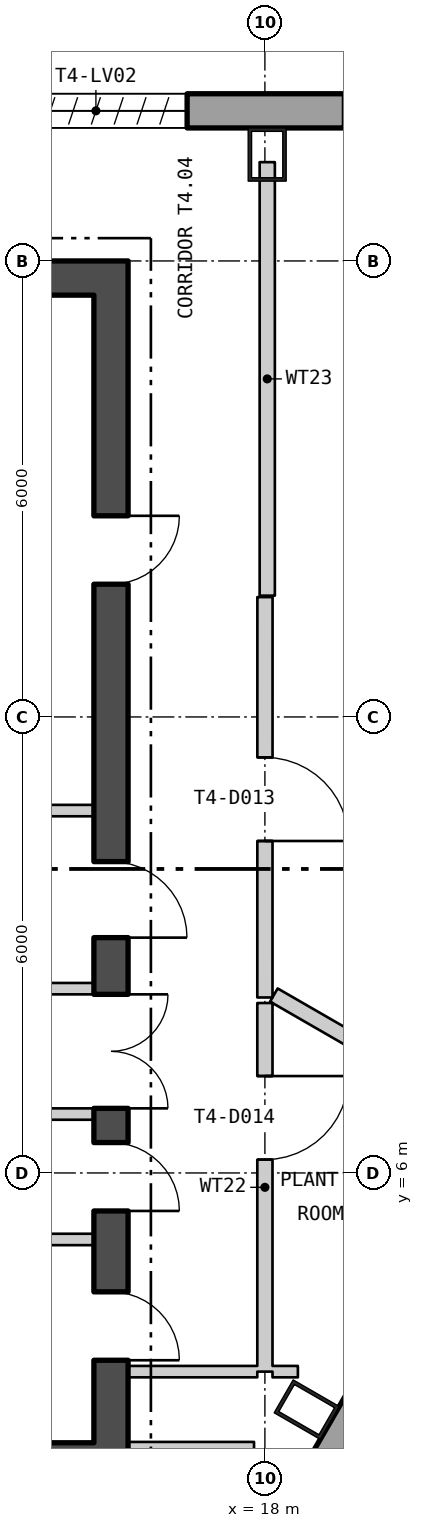
"""IFC4 building model, lengths in metres.
Left out: names, types, materials, properties, quantities, classifications, styles, units other than length and angle.
Written with IfcOpenShell. Run it as: python <this file> out.ifc"""

import sys

from ifc_helpers import new_model, si_unit, direction, frame, frame_2d, origin, origin_2d, place, context, subcontext, project, spatial, polyline, rectangle, hollow_rectangle, outline, extrude, element, fill, save


model = new_model("IFC4")
c1 = context("Model", 3, precision=1e-05, world=origin(), true_north=direction((0.0, 1.0)))
c2 = subcontext(c1, "Body", "Model", "MODEL_VIEW")
j1 = project(units=[si_unit("LENGTHUNIT", "METRE"), si_unit("PLANEANGLEUNIT", "RADIAN")], contexts=[c1])
p1 = place(None, origin())
s1 = spatial("IfcSite", under=j1, at=p1, CompositionType="ELEMENT")
p2 = place(p1, origin())
s2 = spatial("IfcBuilding", under=s1, at=p2, CompositionType="ELEMENT")
p3 = place(p2, frame((0.0, 0.0, 239.4)))
s3 = spatial("IfcBuildingStorey", under=s2, at=p3, CompositionType="ELEMENT", Elevation=239.4)
for number, where, z_axis, x_axis in (
    (1, (18.03, 19.4, 0.0), (0.0, 0.0, 1.0), (-1.0, 0.0, 0.0)),
    (2, (18.55, 2.886, 0.0), (0.0, 0.0, 1.0), (0.5, 0.866, 0.0)),
):
    element("IfcColumn", number, at=place(p3, frame(where, z_axis=z_axis, x_axis=x_axis)), inside=s3, PredefinedType="COLUMN", context=c2, shape_type="SweptSolid", body=[
        extrude(hollow_rectangle(XDim=0.5, YDim=0.7, WallThickness=0.045, at=origin_2d()), origin(), (0.0, 0.0, 1.0), 6.0),
    ])
p4 = place(p3, frame((22.87, 19.975, -0.4), z_axis=(0.0, 0.0, 1.0), x_axis=(-1.0, 0.0, 0.0)))
e3 = element("IfcWall", 3, at=p4, inside=s3, PredefinedType="SOLIDWALL", context=c2, shape_type="SweptSolid", body=[
    extrude(outline(polyline([(-0.13, -0.225), (45.87, -0.225), (45.61, 0.225), (0.13, 0.225), (-0.13, -0.225)])), origin(), (0.0, 0.0, 1.0), 6.0),
])
p5 = place(p4, frame((1.424, 0.0, 1.6)))
e4 = element("IfcOpeningElement", 4, at=p5, cuts=e3, PredefinedType="OPENING", context=c2, shape_type="SweptSolid", body=[
    extrude(rectangle(XDim=2.4, YDim=3.6, at=frame_2d((1.2, 1.8))), frame((0.0, 0.235, 0.0), z_axis=(0.0, -1.0, 0.0), x_axis=(1.0, 0.0, 0.0)), (0.0, 0.0, 1.0), 0.47),
])
p6 = place(p4, frame((5.893, 0.0, 1.6)))
e5 = element("IfcOpeningElement", 5, at=p6, cuts=e3, PredefinedType="OPENING", context=c2, shape_type="SweptSolid", body=[
    extrude(rectangle(XDim=2.4, YDim=3.6, at=frame_2d((1.2, 1.8))), frame((0.0, 0.235, 0.0), z_axis=(0.0, -1.0, 0.0), x_axis=(1.0, 0.0, 0.0)), (0.0, 0.0, 1.0), 0.47),
])
p7 = place(p4, frame((10.401, 0.0, 1.6)))
e6 = element("IfcOpeningElement", 6, at=p7, cuts=e3, PredefinedType="OPENING", context=c2, shape_type="SweptSolid", body=[
    extrude(rectangle(XDim=2.4, YDim=3.6, at=frame_2d((1.2, 1.8))), frame((0.0, 0.235, 0.0), z_axis=(0.0, -1.0, 0.0), x_axis=(1.0, 0.0, 0.0)), (0.0, 0.0, 1.0), 0.47),
])
p8 = place(p4, frame((14.909, 0.0, 1.6)))
e7 = element("IfcOpeningElement", 7, at=p8, cuts=e3, PredefinedType="OPENING", context=c2, shape_type="SweptSolid", body=[
    extrude(rectangle(XDim=2.4, YDim=3.6, at=frame_2d((1.2, 1.8))), frame((0.0, 0.235, 0.0), z_axis=(0.0, -1.0, 0.0), x_axis=(1.0, 0.0, 0.0)), (0.0, 0.0, 1.0), 0.47),
])
p9 = place(p4, frame((19.416, 0.0, 1.6)))
e8 = element("IfcOpeningElement", 8, at=p9, cuts=e3, PredefinedType="OPENING", context=c2, shape_type="SweptSolid", body=[
    extrude(rectangle(XDim=2.4, YDim=3.6, at=frame_2d((1.2, 1.8))), frame((0.0, 0.235, 0.0), z_axis=(0.0, -1.0, 0.0), x_axis=(1.0, 0.0, 0.0)), (0.0, 0.0, 1.0), 0.47),
])
p10 = place(p4, frame((23.924, 0.0, 1.6)))
e9 = element("IfcOpeningElement", 9, at=p10, cuts=e3, PredefinedType="OPENING", context=c2, shape_type="SweptSolid", body=[
    extrude(rectangle(XDim=2.4, YDim=3.6, at=frame_2d((1.2, 1.8))), frame((0.0, 0.235, 0.0), z_axis=(0.0, -1.0, 0.0), x_axis=(1.0, 0.0, 0.0)), (0.0, 0.0, 1.0), 0.47),
])
p11 = place(p4, frame((28.431, 0.0, 1.6)))
e10 = element("IfcOpeningElement", 10, at=p11, cuts=e3, PredefinedType="OPENING", context=c2, shape_type="SweptSolid", body=[
    extrude(rectangle(XDim=2.4, YDim=3.6, at=frame_2d((1.2, 1.8))), frame((0.0, 0.235, 0.0), z_axis=(0.0, -1.0, 0.0), x_axis=(1.0, 0.0, 0.0)), (0.0, 0.0, 1.0), 0.47),
])
p12 = place(p4, frame((32.939, 0.0, 1.6)))
e11 = element("IfcOpeningElement", 11, at=p12, cuts=e3, PredefinedType="OPENING", context=c2, shape_type="SweptSolid", body=[
    extrude(rectangle(XDim=2.4, YDim=3.6, at=frame_2d((1.2, 1.8))), frame((0.0, 0.235, 0.0), z_axis=(0.0, -1.0, 0.0), x_axis=(1.0, 0.0, 0.0)), (0.0, 0.0, 1.0), 0.47),
])
p13 = place(p4, frame((37.447, 0.0, 1.6)))
e12 = element("IfcOpeningElement", 12, at=p13, cuts=e3, PredefinedType="OPENING", context=c2, shape_type="SweptSolid", body=[
    extrude(rectangle(XDim=2.4, YDim=3.6, at=frame_2d((1.2, 1.8))), frame((0.0, 0.235, 0.0), z_axis=(0.0, -1.0, 0.0), x_axis=(1.0, 0.0, 0.0)), (0.0, 0.0, 1.0), 0.47),
])
p14 = place(p4, frame((41.916, 0.0, 1.6)))
e13 = element("IfcOpeningElement", 13, at=p14, cuts=e3, PredefinedType="OPENING", context=c2, shape_type="SweptSolid", body=[
    extrude(rectangle(XDim=2.4, YDim=3.6, at=frame_2d((1.2, 1.8))), frame((0.0, 0.235, 0.0), z_axis=(0.0, -1.0, 0.0), x_axis=(1.0, 0.0, 0.0)), (0.0, 0.0, 1.0), 0.47),
])
p15 = place(p3, frame((3.105, -25.015, -0.18), z_axis=(0.0, 0.0, 1.0), x_axis=(0.499999764979, 0.866025539474, 0.0)))
e14 = element("IfcWall", 14, at=p15, inside=s3, PredefinedType="SOLIDWALL", context=c2, shape_type="SweptSolid", body=[
    extrude(outline(polyline([(-0.13, -0.225), (45.87, -0.225), (45.61, 0.225), (0.13, 0.225), (-0.13, -0.225)])), origin(), (0.0, 0.0, 1.0), 6.0),
])
p16 = place(p15, frame((1.424, 0.0, 1.38)))
e15 = element("IfcOpeningElement", 15, at=p16, cuts=e14, PredefinedType="OPENING", context=c2, shape_type="SweptSolid", body=[
    extrude(rectangle(XDim=2.4, YDim=3.6, at=frame_2d((1.2, 1.8))), frame((0.0, 0.235, 0.0), z_axis=(0.0, -1.0, 0.0), x_axis=(1.0, 0.0, 0.0)), (0.0, 0.0, 1.0), 0.47),
])
p17 = place(p15, frame((5.893, 0.0, 1.38)))
e16 = element("IfcOpeningElement", 16, at=p17, cuts=e14, PredefinedType="OPENING", context=c2, shape_type="SweptSolid", body=[
    extrude(rectangle(XDim=2.4, YDim=3.6, at=frame_2d((1.2, 1.8))), frame((0.0, 0.235, 0.0), z_axis=(0.0, -1.0, 0.0), x_axis=(1.0, 0.0, 0.0)), (0.0, 0.0, 1.0), 0.47),
])
p18 = place(p15, frame((10.401, 0.0, 1.38)))
e17 = element("IfcOpeningElement", 17, at=p18, cuts=e14, PredefinedType="OPENING", context=c2, shape_type="SweptSolid", body=[
    extrude(rectangle(XDim=2.4, YDim=3.6, at=frame_2d((1.2, 1.8))), frame((0.0, 0.235, 0.0), z_axis=(0.0, -1.0, 0.0), x_axis=(1.0, 0.0, 0.0)), (0.0, 0.0, 1.0), 0.47),
])
p19 = place(p15, frame((14.909, 0.0, 1.38)))
e18 = element("IfcOpeningElement", 18, at=p19, cuts=e14, PredefinedType="OPENING", context=c2, shape_type="SweptSolid", body=[
    extrude(rectangle(XDim=2.4, YDim=3.6, at=frame_2d((1.2, 1.8))), frame((0.0, 0.235, 0.0), z_axis=(0.0, -1.0, 0.0), x_axis=(1.0, 0.0, 0.0)), (0.0, 0.0, 1.0), 0.47),
])
p20 = place(p15, frame((19.416, 0.0, 1.38)))
e19 = element("IfcOpeningElement", 19, at=p20, cuts=e14, PredefinedType="OPENING", context=c2, shape_type="SweptSolid", body=[
    extrude(rectangle(XDim=2.4, YDim=3.6, at=frame_2d((1.2, 1.8))), frame((0.0, 0.235, 0.0), z_axis=(0.0, -1.0, 0.0), x_axis=(1.0, 0.0, 0.0)), (0.0, 0.0, 1.0), 0.47),
])
p21 = place(p15, frame((23.924, 0.0, 1.38)))
e20 = element("IfcOpeningElement", 20, at=p21, cuts=e14, PredefinedType="OPENING", context=c2, shape_type="SweptSolid", body=[
    extrude(rectangle(XDim=2.4, YDim=3.6, at=frame_2d((1.2, 1.8))), frame((0.0, 0.235, 0.0), z_axis=(0.0, -1.0, 0.0), x_axis=(1.0, 0.0, 0.0)), (0.0, 0.0, 1.0), 0.47),
])
p22 = place(p15, frame((28.431, 0.0, 1.38)))
e21 = element("IfcOpeningElement", 21, at=p22, cuts=e14, PredefinedType="OPENING", context=c2, shape_type="SweptSolid", body=[
    extrude(rectangle(XDim=2.4, YDim=3.6, at=frame_2d((1.2, 1.8))), frame((0.0, 0.235, 0.0), z_axis=(0.0, -1.0, 0.0), x_axis=(1.0, 0.0, 0.0)), (0.0, 0.0, 1.0), 0.47),
])
p23 = place(p15, frame((32.939, 0.0, 1.38)))
e22 = element("IfcOpeningElement", 22, at=p23, cuts=e14, PredefinedType="OPENING", context=c2, shape_type="SweptSolid", body=[
    extrude(rectangle(XDim=2.4, YDim=3.6, at=frame_2d((1.2, 1.8))), frame((0.0, 0.235, 0.0), z_axis=(0.0, -1.0, 0.0), x_axis=(1.0, 0.0, 0.0)), (0.0, 0.0, 1.0), 0.47),
])
p24 = place(p15, frame((37.447, 0.0, 1.38)))
e23 = element("IfcOpeningElement", 23, at=p24, cuts=e14, PredefinedType="OPENING", context=c2, shape_type="SweptSolid", body=[
    extrude(rectangle(XDim=2.4, YDim=3.6, at=frame_2d((1.2, 1.8))), frame((0.0, 0.235, 0.0), z_axis=(0.0, -1.0, 0.0), x_axis=(1.0, 0.0, 0.0)), (0.0, 0.0, 1.0), 0.47),
])
p25 = place(p15, frame((41.916, 0.0, 1.38)))
e24 = element("IfcOpeningElement", 24, at=p25, cuts=e14, PredefinedType="OPENING", context=c2, shape_type="SweptSolid", body=[
    extrude(rectangle(XDim=2.4, YDim=3.6, at=frame_2d((1.2, 1.8))), frame((0.0, 0.235, 0.0), z_axis=(0.0, -1.0, 0.0), x_axis=(1.0, 0.0, 0.0)), (0.0, 0.0, 1.0), 0.47),
])
p26 = place(p3, frame((-16.2, 2.225, 0.0), z_axis=(0.0, 0.0, 1.0), x_axis=(1.0, 0.0, 0.0)))
e25 = element("IfcWall", 25, at=p26, inside=s3, PredefinedType="SHEAR", context=c2, shape_type="SweptSolid", body=[
    extrude(rectangle(XDim=32.4, YDim=0.45, at=frame_2d((16.2, 0.0))), origin(), (0.0, 0.0, 1.0), 5.8),
])
p27 = place(p26, frame((10.7, 0.0, 0.0)))
e26 = element("IfcOpeningElement", 26, at=p27, cuts=e25, PredefinedType="OPENING", context=c2, shape_type="SweptSolid", body=[
    extrude(rectangle(XDim=1.8, YDim=2.4, at=frame_2d((0.9, 1.2))), frame((0.0, 0.235, 0.0), z_axis=(0.0, -1.0, 0.0), x_axis=(1.0, 0.0, 0.0)), (0.0, 0.0, 1.0), 0.47),
])
p28 = place(p26, frame((20.7, 0.0, 0.0)))
e27 = element("IfcOpeningElement", 27, at=p28, cuts=e25, PredefinedType="OPENING", context=c2, shape_type="SweptSolid", body=[
    extrude(rectangle(XDim=1.8, YDim=2.4, at=frame_2d((0.9, 1.2))), frame((0.0, 0.235, 0.0), z_axis=(0.0, -1.0, 0.0), x_axis=(1.0, 0.0, 0.0)), (0.0, 0.0, 1.0), 0.47),
])
p29 = place(p3, frame((-16.2, 17.775, 0.0), z_axis=(0.0, 0.0, 1.0), x_axis=(1.0, 0.0, 0.0)))
e28 = element("IfcWall", 28, at=p29, inside=s3, PredefinedType="SHEAR", context=c2, shape_type="SweptSolid", body=[
    extrude(rectangle(XDim=32.4, YDim=0.45, at=frame_2d((16.2, 0.0))), origin(), (0.0, 0.0, 1.0), 5.8),
])
p30 = place(p3, frame((15.975, 2.45, 0.0), z_axis=(0.0, 0.0, 1.0), x_axis=(0.0, 1.0, 0.0)))
e29 = element("IfcWall", 29, at=p30, inside=s3, PredefinedType="SHEAR", context=c2, shape_type="SweptSolid", body=[
    extrude(rectangle(XDim=15.1, YDim=0.45, at=frame_2d((7.55, 0.0))), origin(), (0.0, 0.0, 1.0), 5.8),
])
p31 = place(p30, frame((4.4, 0.0, 0.0)))
e30 = element("IfcOpeningElement", 30, at=p31, cuts=e29, PredefinedType="OPENING", context=c2, shape_type="SweptSolid", body=[
    extrude(rectangle(XDim=1.5, YDim=2.1, at=frame_2d((0.75, 1.05))), frame((0.0, 0.235, 0.0), z_axis=(0.0, -1.0, 0.0), x_axis=(1.0, 0.0, 0.0)), (0.0, 0.0, 1.0), 0.47),
])
p32 = place(p30, frame((1.086, 0.0, 0.0)))
e31 = element("IfcOpeningElement", 31, at=p32, cuts=e29, PredefinedType="OPENING", context=c2, shape_type="SweptSolid", body=[
    extrude(rectangle(XDim=0.9, YDim=2.1, at=frame_2d((0.45, 1.05))), frame((0.0, 0.235, 0.0), z_axis=(0.0, -1.0, 0.0), x_axis=(1.0, 0.0, 0.0)), (0.0, 0.0, 1.0), 0.47),
])
p33 = place(p30, frame((3.05, 0.0, 0.0)))
e32 = element("IfcOpeningElement", 32, at=p33, cuts=e29, PredefinedType="OPENING", context=c2, shape_type="SweptSolid", body=[
    extrude(rectangle(XDim=0.9, YDim=2.1, at=frame_2d((0.45, 1.05))), frame((0.0, 0.235, 0.0), z_axis=(0.0, -1.0, 0.0), x_axis=(1.0, 0.0, 0.0)), (0.0, 0.0, 1.0), 0.47),
])
p34 = place(p30, frame((6.646, 0.0, 0.0)))
e33 = element("IfcOpeningElement", 33, at=p34, cuts=e29, PredefinedType="OPENING", context=c2, shape_type="SweptSolid", body=[
    extrude(rectangle(XDim=1.0, YDim=2.1, at=frame_2d((0.5, 1.05))), frame((0.0, 0.235, 0.0), z_axis=(0.0, -1.0, 0.0), x_axis=(1.0, 0.0, 0.0)), (0.0, 0.0, 1.0), 0.47),
])
p35 = place(p30, frame((11.296, 0.0, 0.0)))
e34 = element("IfcOpeningElement", 34, at=p35, cuts=e29, PredefinedType="OPENING", context=c2, shape_type="SweptSolid", body=[
    extrude(rectangle(XDim=0.9, YDim=2.1, at=frame_2d((0.45, 1.05))), frame((0.0, 0.235, 0.0), z_axis=(0.0, -1.0, 0.0), x_axis=(1.0, 0.0, 0.0)), (0.0, 0.0, 1.0), 0.47),
])
for number, where, z_axis, x_axis in (
    (35, (14.5, 6.775, 0.0), (0.0, 0.0, 1.0), (1.0, 0.0, 0.0)),
    (36, (14.5, 8.425, 0.0), (0.0, 0.0, 1.0), (1.0, 0.0, 0.0)),
    (37, (14.5, 5.125, 0.0), (0.0, 0.0, 1.0), (1.0, 0.0, 0.0)),
    (38, (14.5, 10.768, 0.0), (0.0, 0.0, 1.0), (1.0, 0.0, 0.0)),
):
    element("IfcWall", number, at=place(p3, frame(where, z_axis=z_axis, x_axis=x_axis)), inside=s3, PredefinedType="PARTITIONING", context=c2, shape_type="SweptSolid", body=[
        extrude(rectangle(XDim=1.25, YDim=0.15, at=frame_2d((0.625, 0.0))), origin(), (0.0, 0.0, 1.0), 5.8),
    ])
p36 = place(p3, frame((16.2, 2.386, 0.0), z_axis=(0.0, 0.0, 1.0), x_axis=(1.0, 0.0, 0.0)))
e39 = element("IfcWall", 39, at=p36, inside=s3, PredefinedType="PARTITIONING", context=c2, shape_type="SweptSolid", body=[
    extrude(rectangle(XDim=1.657, YDim=0.15, at=frame_2d((0.829, 0.0))), origin(), (0.0, 0.0, 1.0), 5.8),
])
p37 = place(p3, frame((16.2, 3.386, 0.0), z_axis=(0.0, 0.0, 1.0), x_axis=(1.0, 0.0, 0.0)))
e40 = element("IfcWall", 40, at=p37, inside=s3, PredefinedType="PARTITIONING", context=c2, shape_type="SweptSolid", body=[
    extrude(rectangle(XDim=1.7, YDim=0.15, at=frame_2d((0.85, 0.0))), origin(), (0.0, 0.0, 1.0), 5.8),
])
p38 = place(p3, frame((18.0, 8.309, 0.0), z_axis=(0.0, 0.0, 1.0), x_axis=(0.000189825357, 0.999999981983, 0.0)))
e41 = element("IfcWall", 41, at=p38, inside=s3, PredefinedType="PARTITIONING", context=c2, shape_type="SweptSolid", body=[
    extrude(rectangle(XDim=5.268, YDim=0.2, at=frame_2d((2.634, 0.0))), origin(), (0.0, 0.0, 1.0), 5.8),
])
p39 = place(p38, frame((2.059, 0.0, 0.0)))
e42 = element("IfcOpeningElement", 42, at=p39, cuts=e41, PredefinedType="OPENING", context=c2, shape_type="SweptSolid", body=[
    extrude(rectangle(XDim=1.1, YDim=2.1, at=frame_2d((0.55, 1.05))), frame((0.0, 0.11, 0.0), z_axis=(0.0, -1.0, 0.0), x_axis=(1.0, 0.0, 0.0)), (0.0, 0.0, 1.0), 0.22),
])
p40 = place(p3, frame((18.0, 3.386, 0.0), z_axis=(0.0, 0.0, 1.0), x_axis=(0.0, 1.0, 0.0)))
e43 = element("IfcWall", 43, at=p40, inside=s3, PredefinedType="PARTITIONING", context=c2, shape_type="SweptSolid", body=[
    extrude(rectangle(XDim=4.85, YDim=0.2, at=frame_2d((2.425, 0.0))), origin(), (0.0, 0.0, 1.0), 5.8),
])
p41 = place(p40, frame((2.789, 0.0, 0.0)))
e44 = element("IfcOpeningElement", 44, at=p41, cuts=e43, PredefinedType="OPENING", context=c2, shape_type="SweptSolid", body=[
    extrude(rectangle(XDim=1.1, YDim=2.1, at=frame_2d((0.55, 1.05))), frame((0.0, 0.11, 0.0), z_axis=(0.0, -1.0, 0.0), x_axis=(1.0, 0.0, 0.0)), (0.0, 0.0, 1.0), 0.22),
])
p42 = place(p3, frame((18.031, 13.596, 0.0), z_axis=(0.0, 0.0, 1.0), x_axis=(0.0, 1.0, 0.0)))
e45 = element("IfcWall", 45, at=p42, inside=s3, PredefinedType="PARTITIONING", context=c2, shape_type="SweptSolid", body=[
    extrude(rectangle(XDim=5.704, YDim=0.2, at=frame_2d((2.852, 0.0))), origin(), (0.0, 0.0, 1.0), 5.8),
])
p43 = place(p3, frame((18.1, 3.386, 0.0), z_axis=(0.0, 0.0, 1.0), x_axis=(1.0, 0.0, 0.0)))
e46 = element("IfcWall", 46, at=p43, inside=s3, PredefinedType="PARTITIONING", context=c2, shape_type="SweptSolid", body=[
    extrude(rectangle(XDim=0.334, YDim=0.15, at=frame_2d((0.167, 0.0))), origin(), (0.0, 0.0, 1.0), 5.8),
])
p44 = place(p3, frame((18.118, 8.341, 0.0), z_axis=(0.0, 0.0, 1.0), x_axis=(0.866185586049, -0.49972245349, 0.0)))
e47 = element("IfcWall", 47, at=p44, inside=s3, PredefinedType="PARTITIONING", context=c2, shape_type="SweptSolid", body=[
    extrude(rectangle(XDim=3.002, YDim=0.2, at=frame_2d((1.501, 0.0))), origin(), (0.0, 0.0, 1.0), 5.8),
])
p45 = place(p31, origin())
e48 = element("IfcDoor", 48, at=p45, inside=s3, OperationType="DOUBLE_DOOR_SINGLE_SWING", PredefinedType="DOOR", context=c2, shape_type="SweptSolid", body=[
    extrude(rectangle(XDim=1.5, YDim=2.1, at=frame_2d((0.75, 1.05))), frame((0.0, 0.025, 0.0), z_axis=(0.0, -1.0, 0.0), x_axis=(1.0, 0.0, 0.0)), (0.0, 0.0, 1.0), 0.05),
])
fill(e30, e48)
p46 = place(p32, origin())
e49 = element("IfcDoor", 49, at=p46, inside=s3, OperationType="SINGLE_SWING_LEFT", PredefinedType="DOOR", context=c2, shape_type="SweptSolid", body=[
    extrude(rectangle(XDim=0.9, YDim=2.1, at=frame_2d((0.45, 1.05))), frame((0.0, 0.025, 0.0), z_axis=(0.0, -1.0, 0.0), x_axis=(1.0, 0.0, 0.0)), (0.0, 0.0, 1.0), 0.05),
])
fill(e31, e49)
p47 = place(p33, origin())
e50 = element("IfcDoor", 50, at=p47, inside=s3, OperationType="SINGLE_SWING_LEFT", PredefinedType="DOOR", context=c2, shape_type="SweptSolid", body=[
    extrude(rectangle(XDim=0.9, YDim=2.1, at=frame_2d((0.45, 1.05))), frame((0.0, 0.025, 0.0), z_axis=(0.0, -1.0, 0.0), x_axis=(1.0, 0.0, 0.0)), (0.0, 0.0, 1.0), 0.05),
])
fill(e32, e50)
p48 = place(p34, origin())
e51 = element("IfcDoor", 51, at=p48, inside=s3, OperationType="SINGLE_SWING_LEFT", PredefinedType="DOOR", context=c2, shape_type="SweptSolid", body=[
    extrude(rectangle(XDim=1.0, YDim=2.1, at=frame_2d((0.5, 1.05))), frame((0.0, 0.025, 0.0), z_axis=(0.0, -1.0, 0.0), x_axis=(1.0, 0.0, 0.0)), (0.0, 0.0, 1.0), 0.05),
])
fill(e33, e51)
p49 = place(p35, origin())
e52 = element("IfcDoor", 52, at=p49, inside=s3, OperationType="SINGLE_SWING_RIGHT", PredefinedType="DOOR", context=c2, shape_type="SweptSolid", body=[
    extrude(rectangle(XDim=0.9, YDim=2.1, at=frame_2d((0.45, 1.05))), frame((0.0, 0.025, 0.0), z_axis=(0.0, -1.0, 0.0), x_axis=(1.0, 0.0, 0.0)), (0.0, 0.0, 1.0), 0.05),
])
fill(e34, e52)
p50 = place(p39, origin())
e53 = element("IfcDoor", 53, at=p50, inside=s3, OperationType="SINGLE_SWING_LEFT", PredefinedType="DOOR", context=c2, shape_type="SweptSolid", body=[
    extrude(rectangle(XDim=1.1, YDim=2.1, at=frame_2d((0.55, 1.05))), frame((0.0, 0.025, 0.0), z_axis=(0.0, -1.0, 0.0), x_axis=(1.0, 0.0, 0.0)), (0.0, 0.0, 1.0), 0.05),
])
fill(e42, e53)
p51 = place(p41, origin())
e54 = element("IfcDoor", 54, at=p51, inside=s3, OperationType="SINGLE_SWING_RIGHT", PredefinedType="DOOR", context=c2, shape_type="SweptSolid", body=[
    extrude(rectangle(XDim=1.1, YDim=2.1, at=frame_2d((0.55, 1.05))), frame((0.0, 0.025, 0.0), z_axis=(0.0, -1.0, 0.0), x_axis=(1.0, 0.0, 0.0)), (0.0, 0.0, 1.0), 0.05),
])
fill(e44, e54)
save(model, sys.argv[1])
